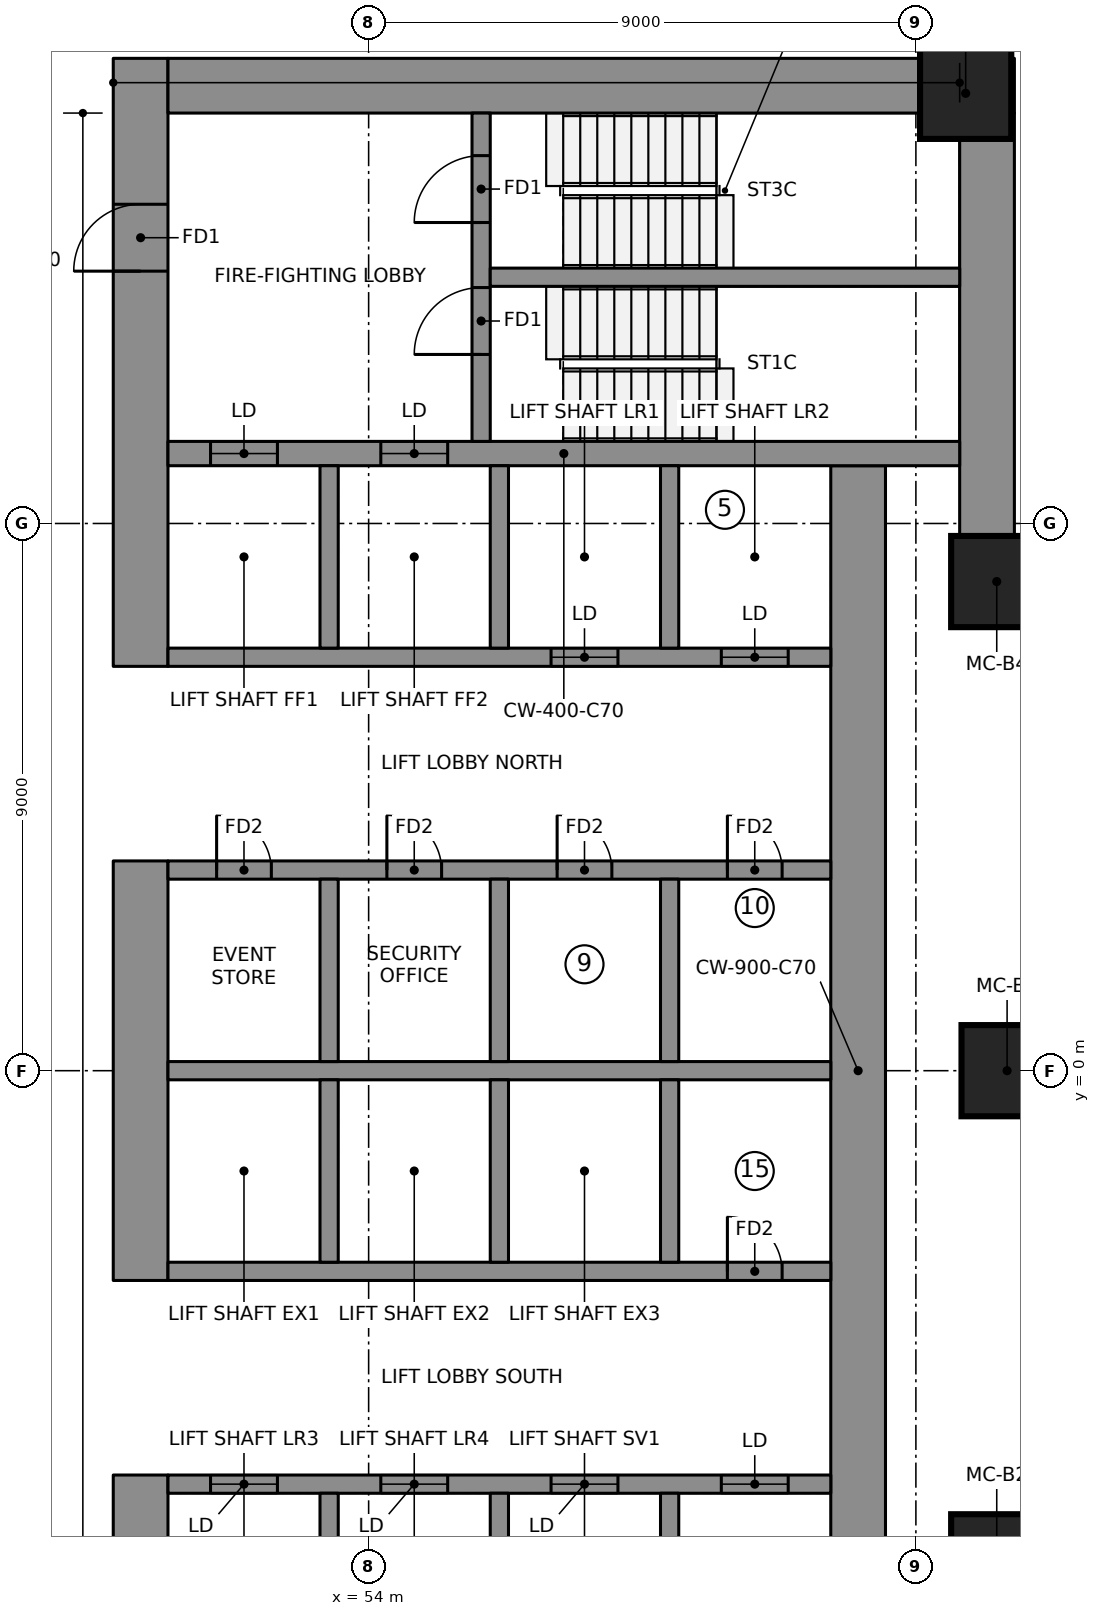
"""IFC4 building model, lengths in metres.
Left out: names, types, materials, properties, quantities, classifications, styles, units other than length and angle.
Written with IfcOpenShell. Run it as: python <this file> out.ifc"""

import sys

from ifc_helpers import new_model, si_unit, direction, frame, frame_2d, origin, origin_2d, place, context, subcontext, project, spatial, rectangle, extrude, element, fill, save


model = new_model("IFC4")
c1 = context("Model", 3, precision=1e-05, world=origin(), true_north=direction((0.0, 1.0)))
c2 = subcontext(c1, "Body", "Model", "MODEL_VIEW")
j1 = project(units=[si_unit("LENGTHUNIT", "METRE"), si_unit("PLANEANGLEUNIT", "RADIAN")], contexts=[c1])
p1 = place(None, origin())
s1 = spatial("IfcSite", under=j1, at=p1, CompositionType="ELEMENT")
p2 = place(p1, origin())
s2 = spatial("IfcBuilding", under=s1, at=p2, CompositionType="ELEMENT")
p3 = place(p2, frame((0.0, 0.0, 130.2)))
s3 = spatial("IfcBuildingStorey", under=s2, at=p3, CompositionType="ELEMENT", Elevation=130.2)
p4 = place(p3, frame((50.25, 6.65, 0.0), z_axis=(0.0, 0.0, 1.0), x_axis=(0.0, 1.0, 0.0)))
e1 = element("IfcWall", 1, at=p4, inside=s3, PredefinedType="SHEAR", context=c2, shape_type="SweptSolid", body=[
    extrude(rectangle(XDim=10.0, YDim=0.9, at=frame_2d((5.0, 0.0))), origin(), (0.0, 0.0, 1.0), 3.55),
])
p5 = place(p4, frame((6.5, 0.0, 0.0)))
e2 = element("IfcOpeningElement", 2, at=p5, cuts=e1, PredefinedType="OPENING", context=c2, shape_type="SweptSolid", body=[
    extrude(rectangle(XDim=1.1, YDim=2.1, at=frame_2d((0.55, 1.05))), frame((0.0, 0.46, 0.0), z_axis=(0.0, -1.0, 0.0), x_axis=(1.0, 0.0, 0.0)), (0.0, 0.0, 1.0), 0.92),
])
p6 = place(p3, frame((50.25, -3.45, 0.0), z_axis=(0.0, 0.0, 1.0), x_axis=(0.0, 1.0, 0.0)))
e3 = element("IfcWall", 3, at=p6, inside=s3, PredefinedType="SHEAR", context=c2, shape_type="SweptSolid", body=[
    extrude(rectangle(XDim=6.9, YDim=0.9, at=frame_2d((3.45, 0.0))), origin(), (0.0, 0.0, 1.0), 3.55),
])
p7 = place(p3, frame((50.25, -16.65, 0.0), z_axis=(0.0, 0.0, 1.0), x_axis=(0.0, 1.0, 0.0)))
e4 = element("IfcWall", 4, at=p7, inside=s3, PredefinedType="SHEAR", context=c2, shape_type="SweptSolid", body=[
    extrude(rectangle(XDim=10.0, YDim=0.9, at=frame_2d((5.0, 0.0))), origin(), (0.0, 0.0, 1.0), 3.55),
])
p8 = place(p7, frame((2.4, 0.0, 0.0)))
e5 = element("IfcOpeningElement", 5, at=p8, cuts=e4, PredefinedType="OPENING", context=c2, shape_type="SweptSolid", body=[
    extrude(rectangle(XDim=1.1, YDim=2.1, at=frame_2d((0.55, 1.05))), frame((0.0, 0.46, 0.0), z_axis=(0.0, -1.0, 0.0), x_axis=(1.0, 0.0, 0.0)), (0.0, 0.0, 1.0), 0.92),
])
p9 = place(p3, frame((50.7, 16.2, 0.0), z_axis=(0.0, 0.0, 1.0), x_axis=(1.0, 0.0, 0.0)))
e6 = element("IfcWall", 6, at=p9, inside=s3, PredefinedType="SHEAR", context=c2, shape_type="SweptSolid", body=[
    extrude(rectangle(XDim=13.92, YDim=0.9, at=frame_2d((6.96, 0.0))), origin(), (0.0, 0.0, 1.0), 3.55),
])
p10 = place(p3, frame((64.17, 8.745, 0.0), z_axis=(0.0, 0.0, 1.0), x_axis=(0.0, 1.0, 0.0)))
e7 = element("IfcWall", 7, at=p10, inside=s3, PredefinedType="SHEAR", context=c2, shape_type="SweptSolid", body=[
    extrude(rectangle(XDim=7.005, YDim=0.9, at=frame_2d((3.503, 0.0))), origin(), (0.0, 0.0, 1.0), 3.55),
])
p11 = place(p3, frame((62.05, -9.95, 0.0), z_axis=(0.0, 0.0, 1.0), x_axis=(0.0, 1.0, 0.0)))
e8 = element("IfcWall", 8, at=p11, inside=s3, PredefinedType="SHEAR", context=c2, shape_type="SweptSolid", body=[
    extrude(rectangle(XDim=19.9, YDim=0.9, at=frame_2d((9.95, 0.0))), origin(), (0.0, 0.0, 1.0), 3.55),
])
p12 = place(p3, frame((50.7, 10.15, 0.0), z_axis=(0.0, 0.0, 1.0), x_axis=(1.0, 0.0, 0.0)))
e9 = element("IfcWall", 9, at=p12, inside=s3, PredefinedType="SHEAR", context=c2, shape_type="SweptSolid", body=[
    extrude(rectangle(XDim=13.02, YDim=0.4, at=frame_2d((6.51, 0.0))), origin(), (0.0, 0.0, 1.0), 3.55),
])
p13 = place(p12, frame((0.7, 0.0, 0.0)))
e10 = element("IfcOpeningElement", 10, at=p13, cuts=e9, PredefinedType="OPENING", context=c2, shape_type="SweptSolid", body=[
    extrude(rectangle(XDim=1.1, YDim=2.1, at=frame_2d((0.55, 1.05))), frame((0.0, 0.21, 0.0), z_axis=(0.0, -1.0, 0.0), x_axis=(1.0, 0.0, 0.0)), (0.0, 0.0, 1.0), 0.42),
])
p14 = place(p12, frame((3.5, 0.0, 0.0)))
e11 = element("IfcOpeningElement", 11, at=p14, cuts=e9, PredefinedType="OPENING", context=c2, shape_type="SweptSolid", body=[
    extrude(rectangle(XDim=1.1, YDim=2.1, at=frame_2d((0.55, 1.05))), frame((0.0, 0.21, 0.0), z_axis=(0.0, -1.0, 0.0), x_axis=(1.0, 0.0, 0.0)), (0.0, 0.0, 1.0), 0.42),
])
p15 = place(p3, frame((50.7, 0.0, 0.0), z_axis=(0.0, 0.0, 1.0), x_axis=(1.0, 0.0, 0.0)))
e12 = element("IfcWall", 12, at=p15, inside=s3, PredefinedType="SHEAR", context=c2, shape_type="SweptSolid", body=[
    extrude(rectangle(XDim=10.9, YDim=0.3, at=frame_2d((5.45, 0.0))), origin(), (0.0, 0.0, 1.0), 3.55),
])
p16 = place(p3, frame((50.7, 3.3, 0.0), z_axis=(0.0, 0.0, 1.0), x_axis=(1.0, 0.0, 0.0)))
e13 = element("IfcWall", 13, at=p16, inside=s3, PredefinedType="SHEAR", context=c2, shape_type="SweptSolid", body=[
    extrude(rectangle(XDim=10.9, YDim=0.3, at=frame_2d((5.45, 0.0))), origin(), (0.0, 0.0, 1.0), 3.55),
])
p17 = place(p16, frame((0.8, 0.0, 0.0)))
e14 = element("IfcOpeningElement", 14, at=p17, cuts=e13, PredefinedType="OPENING", context=c2, shape_type="SweptSolid", body=[
    extrude(rectangle(XDim=0.9, YDim=2.1, at=frame_2d((0.45, 1.05))), frame((0.0, 0.16, 0.0), z_axis=(0.0, -1.0, 0.0), x_axis=(1.0, 0.0, 0.0)), (0.0, 0.0, 1.0), 0.32),
])
p18 = place(p16, frame((3.6, 0.0, 0.0)))
e15 = element("IfcOpeningElement", 15, at=p18, cuts=e13, PredefinedType="OPENING", context=c2, shape_type="SweptSolid", body=[
    extrude(rectangle(XDim=0.9, YDim=2.1, at=frame_2d((0.45, 1.05))), frame((0.0, 0.16, 0.0), z_axis=(0.0, -1.0, 0.0), x_axis=(1.0, 0.0, 0.0)), (0.0, 0.0, 1.0), 0.32),
])
p19 = place(p16, frame((6.4, 0.0, 0.0)))
e16 = element("IfcOpeningElement", 16, at=p19, cuts=e13, PredefinedType="OPENING", context=c2, shape_type="SweptSolid", body=[
    extrude(rectangle(XDim=0.9, YDim=2.1, at=frame_2d((0.45, 1.05))), frame((0.0, 0.16, 0.0), z_axis=(0.0, -1.0, 0.0), x_axis=(1.0, 0.0, 0.0)), (0.0, 0.0, 1.0), 0.32),
])
p20 = place(p16, frame((9.2, 0.0, 0.0)))
e17 = element("IfcOpeningElement", 17, at=p20, cuts=e13, PredefinedType="OPENING", context=c2, shape_type="SweptSolid", body=[
    extrude(rectangle(XDim=0.9, YDim=2.1, at=frame_2d((0.45, 1.05))), frame((0.0, 0.16, 0.0), z_axis=(0.0, -1.0, 0.0), x_axis=(1.0, 0.0, 0.0)), (0.0, 0.0, 1.0), 0.32),
])
p21 = place(p3, frame((50.7, 6.8, 0.0), z_axis=(0.0, 0.0, 1.0), x_axis=(1.0, 0.0, 0.0)))
e18 = element("IfcWall", 18, at=p21, inside=s3, PredefinedType="SHEAR", context=c2, shape_type="SweptSolid", body=[
    extrude(rectangle(XDim=10.9, YDim=0.3, at=frame_2d((5.45, 0.0))), origin(), (0.0, 0.0, 1.0), 3.55),
])
p22 = place(p21, frame((6.3, 0.0, 0.0)))
e19 = element("IfcOpeningElement", 19, at=p22, cuts=e18, PredefinedType="OPENING", context=c2, shape_type="SweptSolid", body=[
    extrude(rectangle(XDim=1.1, YDim=2.1, at=frame_2d((0.55, 1.05))), frame((0.0, 0.16, 0.0), z_axis=(0.0, -1.0, 0.0), x_axis=(1.0, 0.0, 0.0)), (0.0, 0.0, 1.0), 0.32),
])
p23 = place(p21, frame((9.1, 0.0, 0.0)))
e20 = element("IfcOpeningElement", 20, at=p23, cuts=e18, PredefinedType="OPENING", context=c2, shape_type="SweptSolid", body=[
    extrude(rectangle(XDim=1.1, YDim=2.1, at=frame_2d((0.55, 1.05))), frame((0.0, 0.16, 0.0), z_axis=(0.0, -1.0, 0.0), x_axis=(1.0, 0.0, 0.0)), (0.0, 0.0, 1.0), 0.32),
])
for number, where, z_axis, x_axis in (
    (21, (53.35, 0.15, 0.0), (0.0, 0.0, 1.0), (0.0, 1.0, 0.0)),
    (22, (53.35, 6.95, 0.0), (0.0, 0.0, 1.0), (0.0, 1.0, 0.0)),
    (23, (56.15, 0.15, 0.0), (0.0, 0.0, 1.0), (0.0, 1.0, 0.0)),
    (24, (56.15, 6.95, 0.0), (0.0, 0.0, 1.0), (0.0, 1.0, 0.0)),
    (25, (58.95, 0.15, 0.0), (0.0, 0.0, 1.0), (0.0, 1.0, 0.0)),
    (26, (58.95, 6.95, 0.0), (0.0, 0.0, 1.0), (0.0, 1.0, 0.0)),
):
    element("IfcWall", number, at=place(p3, frame(where, z_axis=z_axis, x_axis=x_axis)), inside=s3, PredefinedType="SHEAR", context=c2, shape_type="SweptSolid", body=[
        extrude(rectangle(XDim=3.0, YDim=0.3, at=frame_2d((1.5, 0.0))), origin(), (0.0, 0.0, 1.0), 3.55),
    ])
p24 = place(p3, frame((50.7, -3.3, 0.0), z_axis=(0.0, 0.0, 1.0), x_axis=(1.0, 0.0, 0.0)))
e27 = element("IfcWall", 27, at=p24, inside=s3, PredefinedType="SHEAR", context=c2, shape_type="SweptSolid", body=[
    extrude(rectangle(XDim=10.9, YDim=0.3, at=frame_2d((5.45, 0.0))), origin(), (0.0, 0.0, 1.0), 3.55),
])
p25 = place(p24, frame((9.2, 0.0, 0.0)))
e28 = element("IfcOpeningElement", 28, at=p25, cuts=e27, PredefinedType="OPENING", context=c2, shape_type="SweptSolid", body=[
    extrude(rectangle(XDim=0.9, YDim=2.1, at=frame_2d((0.45, 1.05))), frame((0.0, 0.16, 0.0), z_axis=(0.0, -1.0, 0.0), x_axis=(1.0, 0.0, 0.0)), (0.0, 0.0, 1.0), 0.32),
])
p26 = place(p3, frame((50.7, -6.8, 0.0), z_axis=(0.0, 0.0, 1.0), x_axis=(1.0, 0.0, 0.0)))
e29 = element("IfcWall", 29, at=p26, inside=s3, PredefinedType="SHEAR", context=c2, shape_type="SweptSolid", body=[
    extrude(rectangle(XDim=10.9, YDim=0.3, at=frame_2d((5.45, 0.0))), origin(), (0.0, 0.0, 1.0), 3.55),
])
p27 = place(p26, frame((0.7, 0.0, 0.0)))
e30 = element("IfcOpeningElement", 30, at=p27, cuts=e29, PredefinedType="OPENING", context=c2, shape_type="SweptSolid", body=[
    extrude(rectangle(XDim=1.1, YDim=2.1, at=frame_2d((0.55, 1.05))), frame((0.0, 0.16, 0.0), z_axis=(0.0, -1.0, 0.0), x_axis=(1.0, 0.0, 0.0)), (0.0, 0.0, 1.0), 0.32),
])
p28 = place(p26, frame((3.5, 0.0, 0.0)))
e31 = element("IfcOpeningElement", 31, at=p28, cuts=e29, PredefinedType="OPENING", context=c2, shape_type="SweptSolid", body=[
    extrude(rectangle(XDim=1.1, YDim=2.1, at=frame_2d((0.55, 1.05))), frame((0.0, 0.16, 0.0), z_axis=(0.0, -1.0, 0.0), x_axis=(1.0, 0.0, 0.0)), (0.0, 0.0, 1.0), 0.32),
])
p29 = place(p26, frame((6.3, 0.0, 0.0)))
e32 = element("IfcOpeningElement", 32, at=p29, cuts=e29, PredefinedType="OPENING", context=c2, shape_type="SweptSolid", body=[
    extrude(rectangle(XDim=1.1, YDim=2.1, at=frame_2d((0.55, 1.05))), frame((0.0, 0.16, 0.0), z_axis=(0.0, -1.0, 0.0), x_axis=(1.0, 0.0, 0.0)), (0.0, 0.0, 1.0), 0.32),
])
p30 = place(p26, frame((9.1, 0.0, 0.0)))
e33 = element("IfcOpeningElement", 33, at=p30, cuts=e29, PredefinedType="OPENING", context=c2, shape_type="SweptSolid", body=[
    extrude(rectangle(XDim=1.1, YDim=2.1, at=frame_2d((0.55, 1.05))), frame((0.0, 0.16, 0.0), z_axis=(0.0, -1.0, 0.0), x_axis=(1.0, 0.0, 0.0)), (0.0, 0.0, 1.0), 0.32),
])
for number, where, z_axis, x_axis in (
    (34, (53.35, -3.15, 0.0), (0.0, 0.0, 1.0), (0.0, 1.0, 0.0)),
    (35, (53.35, -9.95, 0.0), (0.0, 0.0, 1.0), (0.0, 1.0, 0.0)),
    (36, (56.15, -3.15, 0.0), (0.0, 0.0, 1.0), (0.0, 1.0, 0.0)),
    (37, (56.15, -9.95, 0.0), (0.0, 0.0, 1.0), (0.0, 1.0, 0.0)),
    (38, (58.95, -3.15, 0.0), (0.0, 0.0, 1.0), (0.0, 1.0, 0.0)),
    (39, (58.95, -9.95, 0.0), (0.0, 0.0, 1.0), (0.0, 1.0, 0.0)),
):
    element("IfcWall", number, at=place(p3, frame(where, z_axis=z_axis, x_axis=x_axis)), inside=s3, PredefinedType="SHEAR", context=c2, shape_type="SweptSolid", body=[
        extrude(rectangle(XDim=3.0, YDim=0.3, at=frame_2d((1.5, 0.0))), origin(), (0.0, 0.0, 1.0), 3.55),
    ])
p31 = place(p3, frame((55.85, 10.35, 0.0), z_axis=(0.0, 0.0, 1.0), x_axis=(0.0, 1.0, 0.0)))
e40 = element("IfcWall", 40, at=p31, inside=s3, PredefinedType="SHEAR", context=c2, shape_type="SweptSolid", body=[
    extrude(rectangle(XDim=5.4, YDim=0.3, at=frame_2d((2.7, 0.0))), origin(), (0.0, 0.0, 1.0), 3.55),
])
p32 = place(p31, frame((1.43, 0.0, 0.0)))
e41 = element("IfcOpeningElement", 41, at=p32, cuts=e40, PredefinedType="OPENING", context=c2, shape_type="SweptSolid", body=[
    extrude(rectangle(XDim=1.1, YDim=2.1, at=frame_2d((0.55, 1.05))), frame((0.0, 0.16, 0.0), z_axis=(0.0, -1.0, 0.0), x_axis=(1.0, 0.0, 0.0)), (0.0, 0.0, 1.0), 0.32),
])
p33 = place(p31, frame((3.6, 0.0, 0.0)))
e42 = element("IfcOpeningElement", 42, at=p33, cuts=e40, PredefinedType="OPENING", context=c2, shape_type="SweptSolid", body=[
    extrude(rectangle(XDim=1.1, YDim=2.1, at=frame_2d((0.55, 1.05))), frame((0.0, 0.16, 0.0), z_axis=(0.0, -1.0, 0.0), x_axis=(1.0, 0.0, 0.0)), (0.0, 0.0, 1.0), 0.32),
])
p34 = place(p3, frame((56.0, 13.05, 0.0), z_axis=(0.0, 0.0, 1.0), x_axis=(1.0, 0.0, 0.0)))
e43 = element("IfcWall", 43, at=p34, inside=s3, PredefinedType="SHEAR", context=c2, shape_type="SweptSolid", body=[
    extrude(rectangle(XDim=7.72, YDim=0.3, at=frame_2d((3.86, 0.0))), origin(), (0.0, 0.0, 1.0), 3.55),
])
for number, where, z_axis, x_axis in (
    (44, (64.33, -8.045, 0.0), (0.0, 0.0, 1.0), (1.0, 0.0, 0.0)),
    (45, (64.5, 0.0, 0.0), (0.0, 0.0, 1.0), (1.0, 0.0, 0.0)),
    (46, (64.33, 8.045, 0.0), (0.0, 0.0, 1.0), (1.0, 0.0, 0.0)),
    (47, (63.819, 16.075, 0.0), (0.0, 0.0, 1.0), (1.0, 0.0, 0.0)),
):
    element("IfcColumn", number, at=place(p3, frame(where, z_axis=z_axis, x_axis=x_axis)), inside=s3, PredefinedType="COLUMN", context=c2, shape_type="SweptSolid", body=[
        extrude(rectangle(XDim=1.5, YDim=1.5, at=origin_2d()), origin(), (0.0, 0.0, 1.0), 3.55),
    ])
p35 = place(p13, origin())
e48 = element("IfcDoor", 48, at=p35, inside=s3, OperationType="DOUBLE_DOOR_SLIDING", PredefinedType="DOOR", context=c2, shape_type="SweptSolid", body=[
    extrude(rectangle(XDim=1.1, YDim=2.1, at=frame_2d((0.55, 1.05))), frame((0.0, 0.025, 0.0), z_axis=(0.0, -1.0, 0.0), x_axis=(1.0, 0.0, 0.0)), (0.0, 0.0, 1.0), 0.05),
])
fill(e10, e48)
p36 = place(p14, origin())
e49 = element("IfcDoor", 49, at=p36, inside=s3, OperationType="DOUBLE_DOOR_SLIDING", PredefinedType="DOOR", context=c2, shape_type="SweptSolid", body=[
    extrude(rectangle(XDim=1.1, YDim=2.1, at=frame_2d((0.55, 1.05))), frame((0.0, 0.025, 0.0), z_axis=(0.0, -1.0, 0.0), x_axis=(1.0, 0.0, 0.0)), (0.0, 0.0, 1.0), 0.05),
])
fill(e11, e49)
p37 = place(p22, origin())
e50 = element("IfcDoor", 50, at=p37, inside=s3, OperationType="DOUBLE_DOOR_SLIDING", PredefinedType="DOOR", context=c2, shape_type="SweptSolid", body=[
    extrude(rectangle(XDim=1.1, YDim=2.1, at=frame_2d((0.55, 1.05))), frame((0.0, 0.025, 0.0), z_axis=(0.0, -1.0, 0.0), x_axis=(1.0, 0.0, 0.0)), (0.0, 0.0, 1.0), 0.05),
])
fill(e19, e50)
p38 = place(p23, origin())
e51 = element("IfcDoor", 51, at=p38, inside=s3, OperationType="DOUBLE_DOOR_SLIDING", PredefinedType="DOOR", context=c2, shape_type="SweptSolid", body=[
    extrude(rectangle(XDim=1.1, YDim=2.1, at=frame_2d((0.55, 1.05))), frame((0.0, 0.025, 0.0), z_axis=(0.0, -1.0, 0.0), x_axis=(1.0, 0.0, 0.0)), (0.0, 0.0, 1.0), 0.05),
])
fill(e20, e51)
p39 = place(p27, origin())
e52 = element("IfcDoor", 52, at=p39, inside=s3, OperationType="DOUBLE_DOOR_SLIDING", PredefinedType="DOOR", context=c2, shape_type="SweptSolid", body=[
    extrude(rectangle(XDim=1.1, YDim=2.1, at=frame_2d((0.55, 1.05))), frame((0.0, 0.025, 0.0), z_axis=(0.0, -1.0, 0.0), x_axis=(1.0, 0.0, 0.0)), (0.0, 0.0, 1.0), 0.05),
])
fill(e30, e52)
p40 = place(p28, origin())
e53 = element("IfcDoor", 53, at=p40, inside=s3, OperationType="DOUBLE_DOOR_SLIDING", PredefinedType="DOOR", context=c2, shape_type="SweptSolid", body=[
    extrude(rectangle(XDim=1.1, YDim=2.1, at=frame_2d((0.55, 1.05))), frame((0.0, 0.025, 0.0), z_axis=(0.0, -1.0, 0.0), x_axis=(1.0, 0.0, 0.0)), (0.0, 0.0, 1.0), 0.05),
])
fill(e31, e53)
p41 = place(p29, origin())
e54 = element("IfcDoor", 54, at=p41, inside=s3, OperationType="DOUBLE_DOOR_SLIDING", PredefinedType="DOOR", context=c2, shape_type="SweptSolid", body=[
    extrude(rectangle(XDim=1.1, YDim=2.1, at=frame_2d((0.55, 1.05))), frame((0.0, 0.025, 0.0), z_axis=(0.0, -1.0, 0.0), x_axis=(1.0, 0.0, 0.0)), (0.0, 0.0, 1.0), 0.05),
])
fill(e32, e54)
p42 = place(p30, origin())
e55 = element("IfcDoor", 55, at=p42, inside=s3, OperationType="DOUBLE_DOOR_SLIDING", PredefinedType="DOOR", context=c2, shape_type="SweptSolid", body=[
    extrude(rectangle(XDim=1.1, YDim=2.1, at=frame_2d((0.55, 1.05))), frame((0.0, 0.025, 0.0), z_axis=(0.0, -1.0, 0.0), x_axis=(1.0, 0.0, 0.0)), (0.0, 0.0, 1.0), 0.05),
])
fill(e33, e55)
p43 = place(p32, origin())
e56 = element("IfcDoor", 56, at=p43, inside=s3, OperationType="SINGLE_SWING_RIGHT", PredefinedType="DOOR", context=c2, shape_type="SweptSolid", body=[
    extrude(rectangle(XDim=1.1, YDim=2.1, at=frame_2d((0.55, 1.05))), frame((0.0, 0.025, 0.0), z_axis=(0.0, -1.0, 0.0), x_axis=(1.0, 0.0, 0.0)), (0.0, 0.0, 1.0), 0.05),
])
fill(e41, e56)
p44 = place(p33, origin())
e57 = element("IfcDoor", 57, at=p44, inside=s3, OperationType="SINGLE_SWING_RIGHT", PredefinedType="DOOR", context=c2, shape_type="SweptSolid", body=[
    extrude(rectangle(XDim=1.1, YDim=2.1, at=frame_2d((0.55, 1.05))), frame((0.0, 0.025, 0.0), z_axis=(0.0, -1.0, 0.0), x_axis=(1.0, 0.0, 0.0)), (0.0, 0.0, 1.0), 0.05),
])
fill(e42, e57)
p45 = place(p5, origin())
e58 = element("IfcDoor", 58, at=p45, inside=s3, OperationType="SINGLE_SWING_RIGHT", PredefinedType="DOOR", context=c2, shape_type="SweptSolid", body=[
    extrude(rectangle(XDim=1.1, YDim=2.1, at=frame_2d((0.55, 1.05))), frame((0.0, 0.025, 0.0), z_axis=(0.0, -1.0, 0.0), x_axis=(1.0, 0.0, 0.0)), (0.0, 0.0, 1.0), 0.05),
])
fill(e2, e58)
p46 = place(p17, origin())
e59 = element("IfcDoor", 59, at=p46, inside=s3, OperationType="SINGLE_SWING_LEFT", PredefinedType="DOOR", context=c2, shape_type="SweptSolid", body=[
    extrude(rectangle(XDim=0.9, YDim=2.1, at=frame_2d((0.45, 1.05))), frame((0.0, 0.025, 0.0), z_axis=(0.0, -1.0, 0.0), x_axis=(1.0, 0.0, 0.0)), (0.0, 0.0, 1.0), 0.05),
])
fill(e14, e59)
p47 = place(p18, origin())
e60 = element("IfcDoor", 60, at=p47, inside=s3, OperationType="SINGLE_SWING_LEFT", PredefinedType="DOOR", context=c2, shape_type="SweptSolid", body=[
    extrude(rectangle(XDim=0.9, YDim=2.1, at=frame_2d((0.45, 1.05))), frame((0.0, 0.025, 0.0), z_axis=(0.0, -1.0, 0.0), x_axis=(1.0, 0.0, 0.0)), (0.0, 0.0, 1.0), 0.05),
])
fill(e15, e60)
p48 = place(p19, origin())
e61 = element("IfcDoor", 61, at=p48, inside=s3, OperationType="SINGLE_SWING_LEFT", PredefinedType="DOOR", context=c2, shape_type="SweptSolid", body=[
    extrude(rectangle(XDim=0.9, YDim=2.1, at=frame_2d((0.45, 1.05))), frame((0.0, 0.025, 0.0), z_axis=(0.0, -1.0, 0.0), x_axis=(1.0, 0.0, 0.0)), (0.0, 0.0, 1.0), 0.05),
])
fill(e16, e61)
p49 = place(p20, origin())
e62 = element("IfcDoor", 62, at=p49, inside=s3, OperationType="SINGLE_SWING_LEFT", PredefinedType="DOOR", context=c2, shape_type="SweptSolid", body=[
    extrude(rectangle(XDim=0.9, YDim=2.1, at=frame_2d((0.45, 1.05))), frame((0.0, 0.025, 0.0), z_axis=(0.0, -1.0, 0.0), x_axis=(1.0, 0.0, 0.0)), (0.0, 0.0, 1.0), 0.05),
])
fill(e17, e62)
p50 = place(p25, origin())
e63 = element("IfcDoor", 63, at=p50, inside=s3, OperationType="SINGLE_SWING_LEFT", PredefinedType="DOOR", context=c2, shape_type="SweptSolid", body=[
    extrude(rectangle(XDim=0.9, YDim=2.1, at=frame_2d((0.45, 1.05))), frame((0.0, 0.025, 0.0), z_axis=(0.0, -1.0, 0.0), x_axis=(1.0, 0.0, 0.0)), (0.0, 0.0, 1.0), 0.05),
])
fill(e28, e63)
save(model, sys.argv[1])
